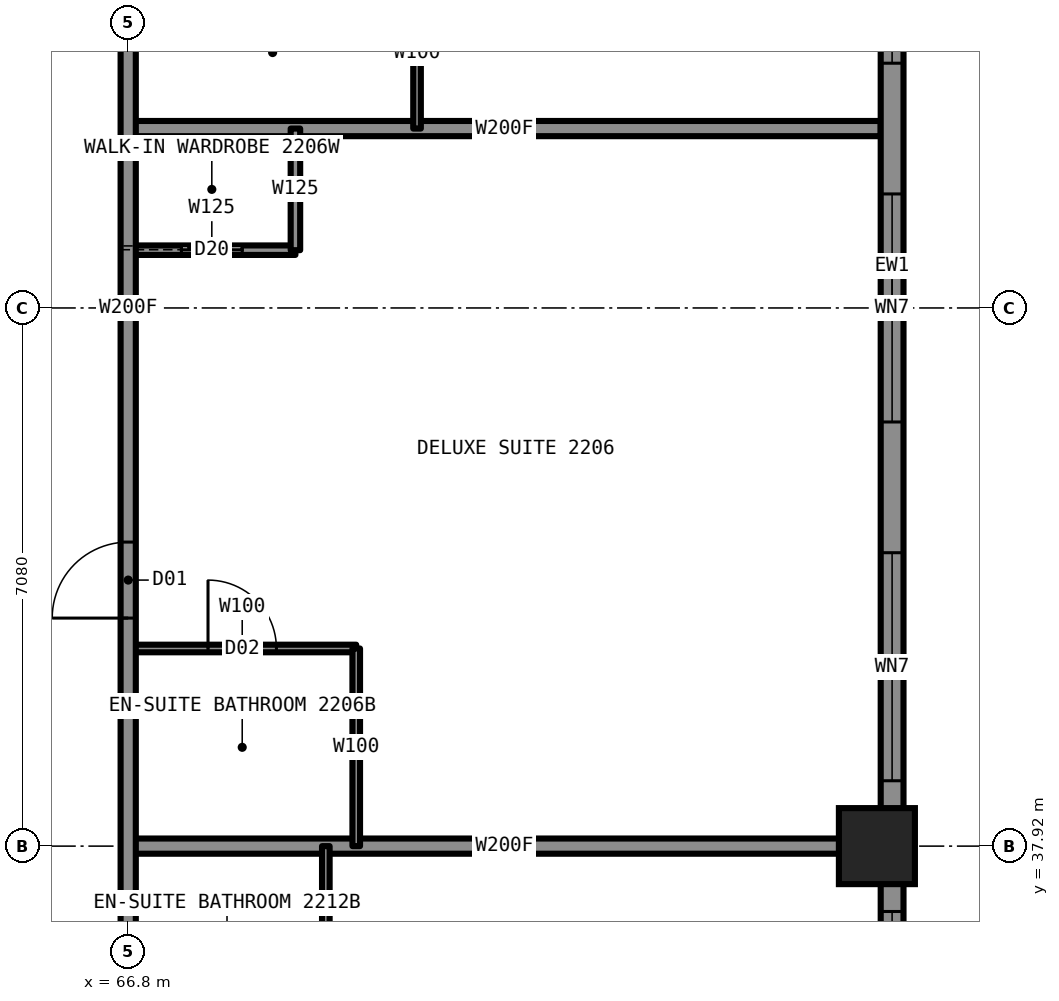
"""IFC4 building model, lengths in metres.
Left out: names, types, materials, properties, quantities, classifications, styles, units other than length and angle.
Written with IfcOpenShell. Run it as: python <this file> out.ifc"""

import sys

from ifc_helpers import new_model, si_unit, direction, frame, frame_2d, origin, origin_2d, place, context, subcontext, project, spatial, rectangle, i_section, extrude, element, fill, save


model = new_model("IFC4")
c1 = context("Model", 3, precision=1e-05, world=origin(), true_north=direction((0.0, 1.0)))
c2 = subcontext(c1, "Body", "Model", "MODEL_VIEW")
j1 = project(units=[si_unit("LENGTHUNIT", "METRE"), si_unit("PLANEANGLEUNIT", "RADIAN")], contexts=[c1])
p1 = place(None, origin())
s1 = spatial("IfcSite", under=j1, at=p1, CompositionType="ELEMENT")
p2 = place(p1, origin())
s2 = spatial("IfcBuilding", under=s1, at=p2, CompositionType="ELEMENT")
p3 = place(p2, frame((0.0, 0.0, 81.0)))
s3 = spatial("IfcBuildingStorey", under=s2, at=p3, CompositionType="ELEMENT", Elevation=81.0)
p4 = place(p3, frame((76.65, 37.92, 0.0), z_axis=(0.0, 0.0, 1.0), x_axis=(1.0, 0.0, 0.0)))
e1 = element("IfcColumn", 1, at=p4, inside=s3, PredefinedType="COLUMN", context=c2, shape_type="SweptSolid", body=[
    extrude(i_section(OverallWidth=0.432, OverallDepth=0.498, WebThickness=0.056, FlangeThickness=0.089, at=origin_2d()), origin(), (0.0, 0.0, 1.0), 3.5),
])
p5 = place(p3, frame((66.8, 40.52, 0.0), z_axis=(0.0, 0.0, 1.0), x_axis=(1.0, 0.0, 0.0)))
e2 = element("IfcWall", 2, at=p5, inside=s3, PredefinedType="PARTITIONING", context=c2, shape_type="SweptSolid", body=[
    extrude(rectangle(XDim=3.0, YDim=0.1, at=frame_2d((1.5, 0.0))), origin(), (0.0, 0.0, 1.0), 3.33),
])
p6 = place(p5, frame((1.05, 0.0, 0.0)))
e3 = element("IfcOpeningElement", 3, at=p6, cuts=e2, PredefinedType="OPENING", context=c2, shape_type="SweptSolid", body=[
    extrude(rectangle(XDim=0.9, YDim=2.1, at=frame_2d((0.45, 1.05))), frame((0.0, 0.06, 0.0), z_axis=(0.0, -1.0, 0.0), x_axis=(1.0, 0.0, 0.0)), (0.0, 0.0, 1.0), 0.12),
])
p7 = place(p3, frame((66.8, 37.92, 0.0), z_axis=(0.0, 0.0, 1.0), x_axis=(1.0, 0.0, 0.0)))
e4 = element("IfcWall", 4, at=p7, inside=s3, PredefinedType="PARTITIONING", context=c2, shape_type="SweptSolid", body=[
    extrude(rectangle(XDim=9.9, YDim=0.2, at=frame_2d((4.95, 0.0))), origin(), (0.0, 0.0, 1.0), 2.573),
])
p8 = place(p3, frame((66.8, 45.76, 0.0), z_axis=(0.0, 0.0, 1.0), x_axis=(1.0, 0.0, 0.0)))
e5 = element("IfcWall", 5, at=p8, inside=s3, PredefinedType="PARTITIONING", context=c2, shape_type="SweptSolid", body=[
    extrude(rectangle(XDim=2.2, YDim=0.125, at=frame_2d((1.1, 0.0))), origin(), (0.0, 0.0, 1.0), 3.33),
])
p9 = place(p8, frame((0.7, 0.0, 0.0)))
e6 = element("IfcOpeningElement", 6, at=p9, cuts=e5, PredefinedType="OPENING", context=c2, shape_type="SweptSolid", body=[
    extrude(rectangle(XDim=0.8, YDim=2.1, at=frame_2d((0.4, 1.05))), frame((0.0, 0.073, 0.0), z_axis=(0.0, -1.0, 0.0), x_axis=(1.0, 0.0, 0.0)), (0.0, 0.0, 1.0), 0.145),
])
p10 = place(p3, frame((66.8, 47.36, 0.0), z_axis=(0.0, 0.0, 1.0), x_axis=(1.0, 0.0, 0.0)))
e7 = element("IfcWall", 7, at=p10, inside=s3, PredefinedType="PARTITIONING", context=c2, shape_type="SweptSolid", body=[
    extrude(rectangle(XDim=9.9, YDim=0.2, at=frame_2d((4.95, 0.0))), origin(), (0.0, 0.0, 1.0), 2.723),
])
p11 = place(p3, frame((66.8, 33.2, 0.0), z_axis=(0.0, 0.0, 1.0), x_axis=(0.0, 1.0, 0.0)))
e8 = element("IfcWall", 8, at=p11, inside=s3, PredefinedType="PARTITIONING", context=c2, shape_type="SweptSolid", body=[
    extrude(rectangle(XDim=23.6, YDim=0.2, at=frame_2d((11.8, 0.0))), origin(), (0.0, 0.0, 1.0), 3.33),
])
p12 = place(p11, frame((7.72, 0.0, 0.0)))
e9 = element("IfcOpeningElement", 9, at=p12, cuts=e8, PredefinedType="OPENING", context=c2, shape_type="SweptSolid", body=[
    extrude(rectangle(XDim=1.0, YDim=2.2, at=frame_2d((0.5, 1.1))), frame((0.0, 0.11, 0.0), z_axis=(0.0, -1.0, 0.0), x_axis=(1.0, 0.0, 0.0)), (0.0, 0.0, 1.0), 0.22),
])
p13 = place(p11, frame((16.42, 0.0, 0.0)))
e10 = element("IfcOpeningElement", 10, at=p13, cuts=e8, PredefinedType="OPENING", context=c2, shape_type="SweptSolid", body=[
    extrude(rectangle(XDim=1.0, YDim=2.2, at=frame_2d((0.5, 1.1))), frame((0.0, 0.11, 0.0), z_axis=(0.0, -1.0, 0.0), x_axis=(1.0, 0.0, 0.0)), (0.0, 0.0, 1.0), 0.22),
])
p14 = place(p11, frame((21.85, 0.0, 0.0)))
e11 = element("IfcOpeningElement", 11, at=p14, cuts=e8, PredefinedType="OPENING", context=c2, shape_type="SweptSolid", body=[
    extrude(rectangle(XDim=1.1, YDim=2.2, at=frame_2d((0.55, 1.1))), frame((0.0, 0.11, 0.0), z_axis=(0.0, -1.0, 0.0), x_axis=(1.0, 0.0, 0.0)), (0.0, 0.0, 1.0), 0.22),
])
p15 = place(p11, frame((0.66, 0.0, 0.0)))
e12 = element("IfcOpeningElement", 12, at=p15, cuts=e8, PredefinedType="OPENING", context=c2, shape_type="SweptSolid", body=[
    extrude(rectangle(XDim=1.1, YDim=2.2, at=frame_2d((0.55, 1.1))), frame((0.0, 0.11, 0.0), z_axis=(0.0, -1.0, 0.0), x_axis=(1.0, 0.0, 0.0)), (0.0, 0.0, 1.0), 0.22),
])
p16 = place(p3, frame((69.0, 45.76, 0.0), z_axis=(0.0, 0.0, 1.0), x_axis=(0.0, 1.0, 0.0)))
e13 = element("IfcWall", 13, at=p16, inside=s3, PredefinedType="PARTITIONING", context=c2, shape_type="SweptSolid", body=[
    extrude(rectangle(XDim=1.6, YDim=0.125, at=frame_2d((0.8, 0.0))), origin(), (0.0, 0.0, 1.0), 3.33),
])
p17 = place(p3, frame((69.4, 35.32, 0.0), z_axis=(0.0, 0.0, 1.0), x_axis=(0.0, 1.0, 0.0)))
e14 = element("IfcWall", 14, at=p17, inside=s3, PredefinedType="PARTITIONING", context=c2, shape_type="SweptSolid", body=[
    extrude(rectangle(XDim=2.6, YDim=0.1, at=frame_2d((1.3, 0.0))), origin(), (0.0, 0.0, 1.0), 3.33),
])
p18 = place(p3, frame((69.8, 37.92, 0.0), z_axis=(0.0, 0.0, 1.0), x_axis=(0.0, 1.0, 0.0)))
e15 = element("IfcWall", 15, at=p18, inside=s3, PredefinedType="PARTITIONING", context=c2, shape_type="SweptSolid", body=[
    extrude(rectangle(XDim=2.6, YDim=0.1, at=frame_2d((1.3, 0.0))), origin(), (0.0, 0.0, 1.0), 3.33),
])
p19 = place(p3, frame((70.6, 47.36, 0.0), z_axis=(0.0, 0.0, 1.0), x_axis=(0.0, 1.0, 0.0)))
e16 = element("IfcWall", 16, at=p19, inside=s3, PredefinedType="PARTITIONING", context=c2, shape_type="SweptSolid", body=[
    extrude(rectangle(XDim=2.0, YDim=0.1, at=frame_2d((1.0, 0.0))), origin(), (0.0, 0.0, 1.0), 3.33),
])
p20 = place(p3, frame((76.85, 28.5, 0.0), z_axis=(0.0, 0.0, 1.0), x_axis=(0.0, 1.0, 0.0)))
e17 = element("IfcWall", 17, at=p20, inside=s3, PredefinedType="SOLIDWALL", context=c2, shape_type="SweptSolid", body=[
    extrude(rectangle(XDim=33.0, YDim=0.3, at=frame_2d((16.5, 0.0))), origin(), (0.0, 0.0, 1.0), 2.63),
])
p21 = place(p20, frame((0.85, 0.0, 0.5)))
e18 = element("IfcOpeningElement", 18, at=p21, cuts=e17, PredefinedType="OPENING", context=c2, shape_type="SweptSolid", body=[
    extrude(rectangle(XDim=3.0, YDim=2.0, at=frame_2d((1.5, 1.0))), frame((0.0, 0.16, 0.0), z_axis=(0.0, -1.0, 0.0), x_axis=(1.0, 0.0, 0.0)), (0.0, 0.0, 1.0), 0.32),
])
p22 = place(p20, frame((5.56, 0.0, 0.5)))
e19 = element("IfcOpeningElement", 19, at=p22, cuts=e17, PredefinedType="OPENING", context=c2, shape_type="SweptSolid", body=[
    extrude(rectangle(XDim=3.0, YDim=2.0, at=frame_2d((1.5, 1.0))), frame((0.0, 0.16, 0.0), z_axis=(0.0, -1.0, 0.0), x_axis=(1.0, 0.0, 0.0)), (0.0, 0.0, 1.0), 0.32),
])
p23 = place(p20, frame((10.28, 0.0, 0.5)))
e20 = element("IfcOpeningElement", 20, at=p23, cuts=e17, PredefinedType="OPENING", context=c2, shape_type="SweptSolid", body=[
    extrude(rectangle(XDim=3.0, YDim=2.0, at=frame_2d((1.5, 1.0))), frame((0.0, 0.16, 0.0), z_axis=(0.0, -1.0, 0.0), x_axis=(1.0, 0.0, 0.0)), (0.0, 0.0, 1.0), 0.32),
])
p24 = place(p20, frame((15.0, 0.0, 0.5)))
e21 = element("IfcOpeningElement", 21, at=p24, cuts=e17, PredefinedType="OPENING", context=c2, shape_type="SweptSolid", body=[
    extrude(rectangle(XDim=3.0, YDim=2.0, at=frame_2d((1.5, 1.0))), frame((0.0, 0.16, 0.0), z_axis=(0.0, -1.0, 0.0), x_axis=(1.0, 0.0, 0.0)), (0.0, 0.0, 1.0), 0.32),
])
p25 = place(p20, frame((19.72, 0.0, 0.5)))
e22 = element("IfcOpeningElement", 22, at=p25, cuts=e17, PredefinedType="OPENING", context=c2, shape_type="SweptSolid", body=[
    extrude(rectangle(XDim=3.0, YDim=2.0, at=frame_2d((1.5, 1.0))), frame((0.0, 0.16, 0.0), z_axis=(0.0, -1.0, 0.0), x_axis=(1.0, 0.0, 0.0)), (0.0, 0.0, 1.0), 0.32),
])
p26 = place(p20, frame((24.44, 0.0, 0.5)))
e23 = element("IfcOpeningElement", 23, at=p26, cuts=e17, PredefinedType="OPENING", context=c2, shape_type="SweptSolid", body=[
    extrude(rectangle(XDim=3.0, YDim=2.0, at=frame_2d((1.5, 1.0))), frame((0.0, 0.16, 0.0), z_axis=(0.0, -1.0, 0.0), x_axis=(1.0, 0.0, 0.0)), (0.0, 0.0, 1.0), 0.32),
])
p27 = place(p20, frame((29.15, 0.0, 0.5)))
e24 = element("IfcOpeningElement", 24, at=p27, cuts=e17, PredefinedType="OPENING", context=c2, shape_type="SweptSolid", body=[
    extrude(rectangle(XDim=3.0, YDim=2.0, at=frame_2d((1.5, 1.0))), frame((0.0, 0.16, 0.0), z_axis=(0.0, -1.0, 0.0), x_axis=(1.0, 0.0, 0.0)), (0.0, 0.0, 1.0), 0.32),
])
p28 = place(p12, origin())
e25 = element("IfcDoor", 25, at=p28, inside=s3, OperationType="SINGLE_SWING_LEFT", PredefinedType="DOOR", context=c2, shape_type="SweptSolid", body=[
    extrude(rectangle(XDim=1.0, YDim=2.2, at=frame_2d((0.5, 1.1))), frame((0.0, 0.025, 0.0), z_axis=(0.0, -1.0, 0.0), x_axis=(1.0, 0.0, 0.0)), (0.0, 0.0, 1.0), 0.05),
])
fill(e9, e25)
p29 = place(p6, origin())
e26 = element("IfcDoor", 26, at=p29, inside=s3, OperationType="SINGLE_SWING_RIGHT", PredefinedType="DOOR", context=c2, shape_type="SweptSolid", body=[
    extrude(rectangle(XDim=0.9, YDim=2.1, at=frame_2d((0.45, 1.05))), frame((0.0, 0.025, 0.0), z_axis=(0.0, -1.0, 0.0), x_axis=(1.0, 0.0, 0.0)), (0.0, 0.0, 1.0), 0.05),
])
fill(e3, e26)
p30 = place(p9, origin())
e27 = element("IfcDoor", 27, at=p30, inside=s3, OperationType="SLIDING_TO_LEFT", PredefinedType="DOOR", context=c2, shape_type="SweptSolid", body=[
    extrude(rectangle(XDim=0.8, YDim=2.1, at=frame_2d((0.4, 1.05))), frame((0.0, 0.025, 0.0), z_axis=(0.0, -1.0, 0.0), x_axis=(1.0, 0.0, 0.0)), (0.0, 0.0, 1.0), 0.05),
])
fill(e6, e27)
p31 = place(p22, origin())
e28 = element("IfcWindow", 28, at=p31, inside=s3, PartitioningType="SINGLE_PANEL", PredefinedType="WINDOW", context=c2, shape_type="SweptSolid", body=[
    extrude(rectangle(XDim=3.0, YDim=2.0, at=frame_2d((1.5, 1.0))), frame((0.0, 0.03, 0.0), z_axis=(0.0, -1.0, 0.0), x_axis=(1.0, 0.0, 0.0)), (0.0, 0.0, 1.0), 0.06),
])
fill(e19, e28)
p32 = place(p23, origin())
e29 = element("IfcWindow", 29, at=p32, inside=s3, PartitioningType="SINGLE_PANEL", PredefinedType="WINDOW", context=c2, shape_type="SweptSolid", body=[
    extrude(rectangle(XDim=3.0, YDim=2.0, at=frame_2d((1.5, 1.0))), frame((0.0, 0.03, 0.0), z_axis=(0.0, -1.0, 0.0), x_axis=(1.0, 0.0, 0.0)), (0.0, 0.0, 1.0), 0.06),
])
fill(e20, e29)
p33 = place(p24, origin())
e30 = element("IfcWindow", 30, at=p33, inside=s3, PartitioningType="SINGLE_PANEL", PredefinedType="WINDOW", context=c2, shape_type="SweptSolid", body=[
    extrude(rectangle(XDim=3.0, YDim=2.0, at=frame_2d((1.5, 1.0))), frame((0.0, 0.03, 0.0), z_axis=(0.0, -1.0, 0.0), x_axis=(1.0, 0.0, 0.0)), (0.0, 0.0, 1.0), 0.06),
])
fill(e21, e30)
p34 = place(p25, origin())
e31 = element("IfcWindow", 31, at=p34, inside=s3, PartitioningType="SINGLE_PANEL", PredefinedType="WINDOW", context=c2, shape_type="SweptSolid", body=[
    extrude(rectangle(XDim=3.0, YDim=2.0, at=frame_2d((1.5, 1.0))), frame((0.0, 0.03, 0.0), z_axis=(0.0, -1.0, 0.0), x_axis=(1.0, 0.0, 0.0)), (0.0, 0.0, 1.0), 0.06),
])
fill(e22, e31)
save(model, sys.argv[1])
